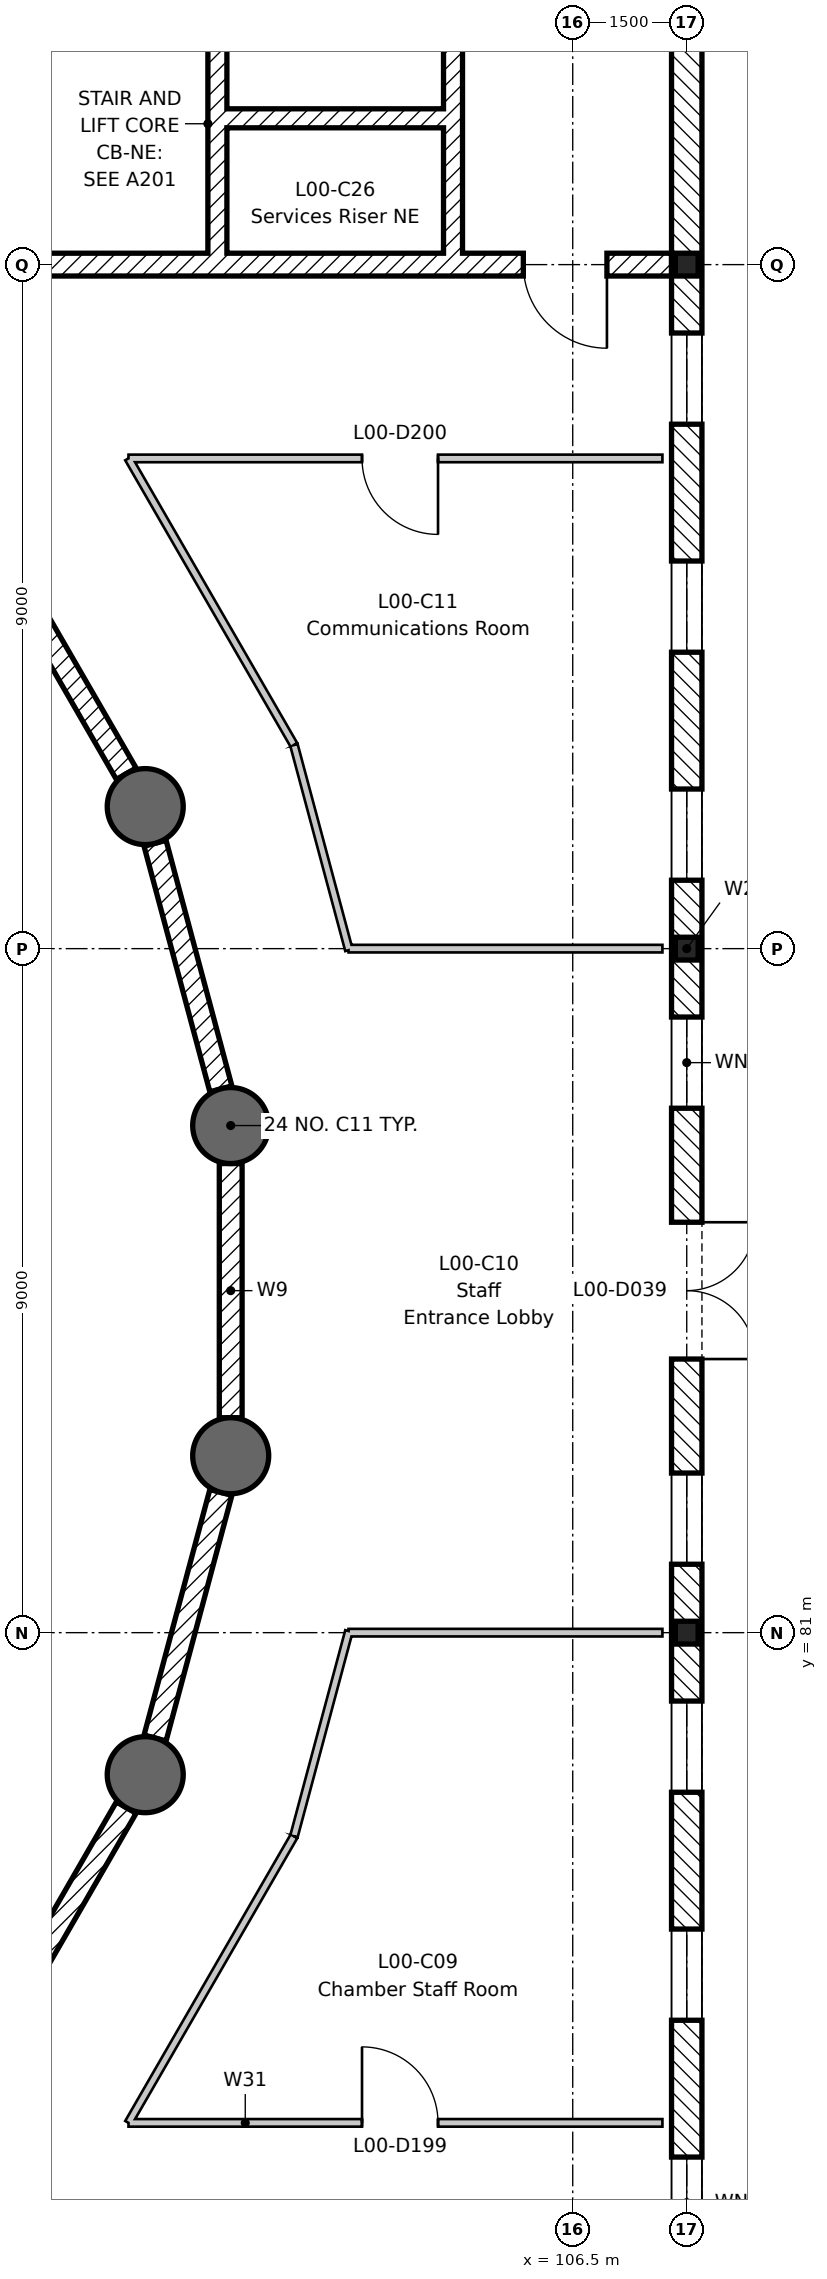
"""IFC4 building model, lengths in metres.
Left out: names, types, materials, properties, quantities, classifications, styles, units other than length and angle.
Written with IfcOpenShell. Run it as: python <this file> out.ifc"""

import sys

from ifc_helpers import new_model, si_unit, direction, frame, frame_2d, origin, origin_2d, place, context, subcontext, project, spatial, rectangle, circle, i_section, extrude, element, fill, save


model = new_model("IFC4")
c1 = context("Model", 3, precision=1e-05, world=origin(), true_north=direction((0.0, 1.0)))
c2 = subcontext(c1, "Body", "Model", "MODEL_VIEW")
j1 = project(units=[si_unit("LENGTHUNIT", "METRE"), si_unit("PLANEANGLEUNIT", "RADIAN")], contexts=[c1])
p1 = place(None, origin())
s1 = spatial("IfcSite", under=j1, at=p1, CompositionType="ELEMENT")
p2 = place(p1, origin())
s2 = spatial("IfcBuilding", under=s1, at=p2, CompositionType="ELEMENT")
p3 = place(p2, origin())
s3 = spatial("IfcBuildingStorey", under=s2, at=p3, CompositionType="ELEMENT", Elevation=0.0)
for number, where, z_axis, x_axis in (
    (1, (102.0, 87.672, -0.6), (0.0, 0.0, 1.0), (1.0, 0.0, 0.0)),
    (2, (100.875, 91.869, -0.6), (0.0, 0.0, 1.0), (1.0, 0.0, 0.0)),
    (3, (100.875, 79.131, -0.6), (0.0, 0.0, 1.0), (1.0, 0.0, 0.0)),
    (4, (102.0, 83.328, -0.6), (0.0, 0.0, 1.0), (1.0, 0.0, 0.0)),
):
    element("IfcColumn", number, at=place(p3, frame(where, z_axis=z_axis, x_axis=x_axis)), inside=s3, PredefinedType="COLUMN", context=c2, shape_type="SweptSolid", body=[
        extrude(circle(Radius=0.5, at=origin_2d()), origin(), (0.0, 0.0, 1.0), 5.8),
    ])
for number, where, z_axis, x_axis in (
    (5, (108.0, 81.0, -0.6), (0.0, 0.0, 1.0), (1.0, 0.0, 0.0)),
    (6, (108.0, 90.0, -0.6), (0.0, 0.0, 1.0), (1.0, 0.0, 0.0)),
    (7, (108.0, 99.0, -0.6), (0.0, 0.0, 1.0), (1.0, 0.0, 0.0)),
):
    element("IfcColumn", number, at=place(p3, frame(where, z_axis=z_axis, x_axis=x_axis)), inside=s3, PredefinedType="COLUMN", context=c2, shape_type="SweptSolid", body=[
        extrude(i_section(OverallWidth=0.3, OverallDepth=0.3, WebThickness=0.011, FlangeThickness=0.019, FilletRadius=0.027, at=origin_2d()), origin(), (0.0, 0.0, 1.0), 5.8),
    ])
for number, where, z_axis, x_axis in (
    (8, (101.871, 88.155, 0.0), (0.0, 0.0, 1.0), (-0.259, 0.966, 0.0)),
    (9, (100.625, 92.302, 0.0), (0.0, 0.0, 1.0), (-0.5, 0.866, 0.0)),
    (10, (98.953, 75.802, 0.0), (0.0, 0.0, 1.0), (0.5, 0.866, 0.0)),
    (11, (101.005, 79.614, 0.0), (0.0, 0.0, 1.0), (0.259, 0.966, 0.0)),
):
    element("IfcWall", number, at=place(p3, frame(where, z_axis=z_axis, x_axis=x_axis)), inside=s3, PredefinedType="PARTITIONING", context=c2, shape_type="SweptSolid", body=[
        extrude(rectangle(XDim=3.344, YDim=0.3, at=frame_2d((1.672, 0.0))), origin(), (0.0, 0.0, 1.0), 4.91),
    ])
p4 = place(p3, frame((102.0, 83.828, 0.0), z_axis=(0.0, 0.0, 1.0), x_axis=(0.0, 1.0, 0.0)))
e12 = element("IfcWall", 12, at=p4, inside=s3, PredefinedType="PARTITIONING", context=c2, shape_type="SweptSolid", body=[
    extrude(rectangle(XDim=3.345, YDim=0.3, at=frame_2d((1.672, 0.0))), origin(), (0.0, 0.0, 1.0), 4.91),
])
p5 = place(p3, frame((107.8, 99.0, 0.0), z_axis=(0.0, 0.0, 1.0), x_axis=(-1.0, 0.0, 0.0)))
e13 = element("IfcWall", 13, at=p5, inside=s3, PredefinedType="SHEAR", context=c2, shape_type="SweptSolid", body=[
    extrude(rectangle(XDim=8.95, YDim=0.3, at=frame_2d((4.475, 0.0))), origin(), (0.0, 0.0, 1.0), 5.2),
])
p6 = place(p5, frame((0.85, 0.0, 0.0)))
e14 = element("IfcOpeningElement", 14, at=p6, cuts=e13, PredefinedType="OPENING", context=c2, shape_type="SweptSolid", body=[
    extrude(rectangle(XDim=1.1, YDim=2.1, at=frame_2d((0.55, 1.05))), frame((0.0, 0.16, 0.0), z_axis=(0.0, -1.0, 0.0), x_axis=(1.0, 0.0, 0.0)), (0.0, 0.0, 1.0), 0.32),
])
p7 = place(p3, frame((104.925, 107.8, 0.0), z_axis=(0.0, 0.0, 1.0), x_axis=(0.0, -1.0, 0.0)))
e15 = element("IfcWall", 15, at=p7, inside=s3, PredefinedType="SHEAR", context=c2, shape_type="SweptSolid", body=[
    extrude(rectangle(XDim=8.65, YDim=0.25, at=frame_2d((4.325, 0.0))), origin(), (0.0, 0.0, 1.0), 5.2),
])
p8 = place(p7, frame((0.4, 0.0, 0.0)))
e16 = element("IfcOpeningElement", 16, at=p8, cuts=e15, PredefinedType="OPENING", context=c2, shape_type="SweptSolid", body=[
    extrude(rectangle(XDim=1.0, YDim=2.1, at=frame_2d((0.5, 1.05))), frame((0.0, 0.135, 0.0), z_axis=(0.0, -1.0, 0.0), x_axis=(1.0, 0.0, 0.0)), (0.0, 0.0, 1.0), 0.27),
])
p9 = place(p3, frame((101.825, 107.8, 0.0), z_axis=(0.0, 0.0, 1.0), x_axis=(0.0, -1.0, 0.0)))
e17 = element("IfcWall", 17, at=p9, inside=s3, PredefinedType="SHEAR", context=c2, shape_type="SweptSolid", body=[
    extrude(rectangle(XDim=8.65, YDim=0.25, at=frame_2d((4.325, 0.0))), origin(), (0.0, 0.0, 1.0), 5.2),
])
p10 = place(p3, frame((104.8, 100.925, 0.0), z_axis=(0.0, 0.0, 1.0), x_axis=(-1.0, 0.0, 0.0)))
e18 = element("IfcWall", 18, at=p10, inside=s3, PredefinedType="SHEAR", context=c2, shape_type="SweptSolid", body=[
    extrude(rectangle(XDim=2.85, YDim=0.25, at=frame_2d((1.425, 0.0))), origin(), (0.0, 0.0, 1.0), 5.2),
])
p11 = place(p3, frame((108.0, 72.0, 0.0), z_axis=(0.0, 0.0, 1.0), x_axis=(0.0, 1.0, 0.0)))
e19 = element("IfcWall", 19, at=p11, inside=s3, PredefinedType="STANDARD", context=c2, shape_type="SweptSolid", body=[
    extrude(rectangle(XDim=27.0, YDim=0.4, at=frame_2d((13.5, 0.0))), origin(), (0.0, 0.0, 1.0), 4.71),
])
p12 = place(p11, frame((12.6, 0.0, 0.0)))
e20 = element("IfcOpeningElement", 20, at=p12, cuts=e19, PredefinedType="OPENING", context=c2, shape_type="SweptSolid", body=[
    extrude(rectangle(XDim=1.8, YDim=2.4, at=frame_2d((0.9, 1.2))), frame((0.0, 0.21, 0.0), z_axis=(0.0, -1.0, 0.0), x_axis=(1.0, 0.0, 0.0)), (0.0, 0.0, 1.0), 0.42),
])
p13 = place(p11, frame((0.9, 0.0, 0.9)))
e21 = element("IfcOpeningElement", 21, at=p13, cuts=e19, PredefinedType="OPENING", context=c2, shape_type="SweptSolid", body=[
    extrude(rectangle(XDim=1.2, YDim=2.4, at=frame_2d((0.6, 1.2))), frame((0.0, 0.21, 0.0), z_axis=(0.0, -1.0, 0.0), x_axis=(1.0, 0.0, 0.0)), (0.0, 0.0, 1.0), 0.42),
])
p14 = place(p11, frame((3.9, 0.0, 0.9)))
e22 = element("IfcOpeningElement", 22, at=p14, cuts=e19, PredefinedType="OPENING", context=c2, shape_type="SweptSolid", body=[
    extrude(rectangle(XDim=1.2, YDim=2.4, at=frame_2d((0.6, 1.2))), frame((0.0, 0.21, 0.0), z_axis=(0.0, -1.0, 0.0), x_axis=(1.0, 0.0, 0.0)), (0.0, 0.0, 1.0), 0.42),
])
p15 = place(p11, frame((6.9, 0.0, 0.9)))
e23 = element("IfcOpeningElement", 23, at=p15, cuts=e19, PredefinedType="OPENING", context=c2, shape_type="SweptSolid", body=[
    extrude(rectangle(XDim=1.2, YDim=2.4, at=frame_2d((0.6, 1.2))), frame((0.0, 0.21, 0.0), z_axis=(0.0, -1.0, 0.0), x_axis=(1.0, 0.0, 0.0)), (0.0, 0.0, 1.0), 0.42),
])
p16 = place(p11, frame((9.9, 0.0, 0.9)))
e24 = element("IfcOpeningElement", 24, at=p16, cuts=e19, PredefinedType="OPENING", context=c2, shape_type="SweptSolid", body=[
    extrude(rectangle(XDim=1.2, YDim=2.4, at=frame_2d((0.6, 1.2))), frame((0.0, 0.21, 0.0), z_axis=(0.0, -1.0, 0.0), x_axis=(1.0, 0.0, 0.0)), (0.0, 0.0, 1.0), 0.42),
])
p17 = place(p11, frame((15.9, 0.0, 0.9)))
e25 = element("IfcOpeningElement", 25, at=p17, cuts=e19, PredefinedType="OPENING", context=c2, shape_type="SweptSolid", body=[
    extrude(rectangle(XDim=1.2, YDim=2.4, at=frame_2d((0.6, 1.2))), frame((0.0, 0.21, 0.0), z_axis=(0.0, -1.0, 0.0), x_axis=(1.0, 0.0, 0.0)), (0.0, 0.0, 1.0), 0.42),
])
p18 = place(p11, frame((18.9, 0.0, 0.9)))
e26 = element("IfcOpeningElement", 26, at=p18, cuts=e19, PredefinedType="OPENING", context=c2, shape_type="SweptSolid", body=[
    extrude(rectangle(XDim=1.2, YDim=2.4, at=frame_2d((0.6, 1.2))), frame((0.0, 0.21, 0.0), z_axis=(0.0, -1.0, 0.0), x_axis=(1.0, 0.0, 0.0)), (0.0, 0.0, 1.0), 0.42),
])
p19 = place(p11, frame((21.9, 0.0, 0.9)))
e27 = element("IfcOpeningElement", 27, at=p19, cuts=e19, PredefinedType="OPENING", context=c2, shape_type="SweptSolid", body=[
    extrude(rectangle(XDim=1.2, YDim=2.4, at=frame_2d((0.6, 1.2))), frame((0.0, 0.21, 0.0), z_axis=(0.0, -1.0, 0.0), x_axis=(1.0, 0.0, 0.0)), (0.0, 0.0, 1.0), 0.42),
])
p20 = place(p11, frame((24.9, 0.0, 0.9)))
e28 = element("IfcOpeningElement", 28, at=p20, cuts=e19, PredefinedType="OPENING", context=c2, shape_type="SweptSolid", body=[
    extrude(rectangle(XDim=1.2, YDim=2.4, at=frame_2d((0.6, 1.2))), frame((0.0, 0.21, 0.0), z_axis=(0.0, -1.0, 0.0), x_axis=(1.0, 0.0, 0.0)), (0.0, 0.0, 1.0), 0.42),
])
p21 = place(p3, frame((108.0, 99.0, 0.0), z_axis=(0.0, 0.0, 1.0), x_axis=(0.0, 1.0, 0.0)))
e29 = element("IfcWall", 29, at=p21, inside=s3, PredefinedType="STANDARD", context=c2, shape_type="SweptSolid", body=[
    extrude(rectangle(XDim=4.4, YDim=0.4, at=frame_2d((2.2, 0.0))), origin(), (0.0, 0.0, 1.0), 5.2),
])
p22 = place(p3, frame((107.68, 81.0, 0.0), z_axis=(0.0, 0.0, 1.0), x_axis=(-1.0, 0.0, 0.0)))
e30 = element("IfcWall", 30, at=p22, inside=s3, PredefinedType="PARTITIONING", context=c2, shape_type="SweptSolid", body=[
    extrude(rectangle(XDim=4.13, YDim=0.1, at=frame_2d((2.065, 0.0))), origin(), (0.0, 0.0, 1.0), 4.71),
])
p23 = place(p3, frame((103.556, 81.02, 0.0), z_axis=(0.0, 0.0, 1.0), x_axis=(-0.258782667083, -0.965935573016, 0.0)))
e31 = element("IfcWall", 31, at=p23, inside=s3, PredefinedType="PARTITIONING", context=c2, shape_type="SweptSolid", body=[
    extrude(rectangle(XDim=2.794, YDim=0.1, at=frame_2d((1.397, 0.0))), origin(), (0.0, 0.0, 1.0), 4.71),
])
p24 = place(p3, frame((102.833, 78.321, 0.0), z_axis=(0.0, 0.0, 1.0), x_axis=(-0.499992644437, -0.866029650479, 0.0)))
e32 = element("IfcWall", 32, at=p24, inside=s3, PredefinedType="PARTITIONING", context=c2, shape_type="SweptSolid", body=[
    extrude(rectangle(XDim=4.354, YDim=0.1, at=frame_2d((2.177, 0.0))), origin(), (0.0, 0.0, 1.0), 4.71),
])
p25 = place(p3, frame((100.656, 74.55, 0.0), z_axis=(0.0, 0.0, 1.0), x_axis=(1.0, 0.0, 0.0)))
e33 = element("IfcWall", 33, at=p25, inside=s3, PredefinedType="PARTITIONING", context=c2, shape_type="SweptSolid", body=[
    extrude(rectangle(XDim=7.024, YDim=0.1, at=frame_2d((3.512, 0.0))), origin(), (0.0, 0.0, 1.0), 4.71),
])
p26 = place(p25, frame((3.072, 0.0, 0.0)))
e34 = element("IfcOpeningElement", 34, at=p26, cuts=e33, PredefinedType="OPENING", context=c2, shape_type="SweptSolid", body=[
    extrude(rectangle(XDim=1.0, YDim=2.1, at=frame_2d((0.5, 1.05))), frame((0.0, 0.06, 0.0), z_axis=(0.0, -1.0, 0.0), x_axis=(1.0, 0.0, 0.0)), (0.0, 0.0, 1.0), 0.12),
])
p27 = place(p3, frame((107.68, 90.0, 0.0), z_axis=(0.0, 0.0, 1.0), x_axis=(-1.0, 0.0, 0.0)))
e35 = element("IfcWall", 35, at=p27, inside=s3, PredefinedType="PARTITIONING", context=c2, shape_type="SweptSolid", body=[
    extrude(rectangle(XDim=4.13, YDim=0.1, at=frame_2d((2.065, 0.0))), origin(), (0.0, 0.0, 1.0), 4.71),
])
p28 = place(p3, frame((107.68, 96.45, 0.0), z_axis=(0.0, 0.0, 1.0), x_axis=(-1.0, 0.0, 0.0)))
e36 = element("IfcWall", 36, at=p28, inside=s3, PredefinedType="PARTITIONING", context=c2, shape_type="SweptSolid", body=[
    extrude(rectangle(XDim=7.024, YDim=0.1, at=frame_2d((3.512, 0.0))), origin(), (0.0, 0.0, 1.0), 4.71),
])
p29 = place(p28, frame((2.952, 0.0, 0.0)))
e37 = element("IfcOpeningElement", 37, at=p29, cuts=e36, PredefinedType="OPENING", context=c2, shape_type="SweptSolid", body=[
    extrude(rectangle(XDim=1.0, YDim=2.1, at=frame_2d((0.5, 1.05))), frame((0.0, 0.06, 0.0), z_axis=(0.0, -1.0, 0.0), x_axis=(1.0, 0.0, 0.0)), (0.0, 0.0, 1.0), 0.12),
])
p30 = place(p3, frame((100.656, 96.45, 0.0), z_axis=(0.0, 0.0, 1.0), x_axis=(0.499992644437, -0.866029650479, 0.0)))
e38 = element("IfcWall", 38, at=p30, inside=s3, PredefinedType="PARTITIONING", context=c2, shape_type="SweptSolid", body=[
    extrude(rectangle(XDim=4.354, YDim=0.1, at=frame_2d((2.177, 0.0))), origin(), (0.0, 0.0, 1.0), 4.71),
])
p31 = place(p3, frame((102.833, 92.679, 0.0), z_axis=(0.0, 0.0, 1.0), x_axis=(0.258782667083, -0.965935573016, 0.0)))
e39 = element("IfcWall", 39, at=p31, inside=s3, PredefinedType="PARTITIONING", context=c2, shape_type="SweptSolid", body=[
    extrude(rectangle(XDim=2.794, YDim=0.1, at=frame_2d((1.397, 0.0))), origin(), (0.0, 0.0, 1.0), 4.71),
])
p32 = place(p12, frame((1.8, 0.0, 0.0), z_axis=(0.0, 0.0, 1.0), x_axis=(-1.0, 0.0, 0.0)))
e40 = element("IfcDoor", 40, at=p32, inside=s3, OperationType="DOUBLE_DOOR_SINGLE_SWING", PredefinedType="DOOR", context=c2, shape_type="SweptSolid", body=[
    extrude(rectangle(XDim=1.8, YDim=2.4, at=frame_2d((0.9, 1.2))), frame((0.0, 0.025, 0.0), z_axis=(0.0, -1.0, 0.0), x_axis=(1.0, 0.0, 0.0)), (0.0, 0.0, 1.0), 0.05),
])
fill(e20, e40)
p33 = place(p13, origin())
e41 = element("IfcWindow", 41, at=p33, inside=s3, PartitioningType="SINGLE_PANEL", PredefinedType="WINDOW", context=c2, shape_type="SweptSolid", body=[
    extrude(rectangle(XDim=1.2, YDim=2.4, at=frame_2d((0.6, 1.2))), frame((0.0, 0.03, 0.0), z_axis=(0.0, -1.0, 0.0), x_axis=(1.0, 0.0, 0.0)), (0.0, 0.0, 1.0), 0.06),
])
fill(e21, e41)
p34 = place(p14, origin())
e42 = element("IfcWindow", 42, at=p34, inside=s3, PartitioningType="SINGLE_PANEL", PredefinedType="WINDOW", context=c2, shape_type="SweptSolid", body=[
    extrude(rectangle(XDim=1.2, YDim=2.4, at=frame_2d((0.6, 1.2))), frame((0.0, 0.03, 0.0), z_axis=(0.0, -1.0, 0.0), x_axis=(1.0, 0.0, 0.0)), (0.0, 0.0, 1.0), 0.06),
])
fill(e22, e42)
p35 = place(p15, origin())
e43 = element("IfcWindow", 43, at=p35, inside=s3, PartitioningType="SINGLE_PANEL", PredefinedType="WINDOW", context=c2, shape_type="SweptSolid", body=[
    extrude(rectangle(XDim=1.2, YDim=2.4, at=frame_2d((0.6, 1.2))), frame((0.0, 0.03, 0.0), z_axis=(0.0, -1.0, 0.0), x_axis=(1.0, 0.0, 0.0)), (0.0, 0.0, 1.0), 0.06),
])
fill(e23, e43)
p36 = place(p16, origin())
e44 = element("IfcWindow", 44, at=p36, inside=s3, PartitioningType="SINGLE_PANEL", PredefinedType="WINDOW", context=c2, shape_type="SweptSolid", body=[
    extrude(rectangle(XDim=1.2, YDim=2.4, at=frame_2d((0.6, 1.2))), frame((0.0, 0.03, 0.0), z_axis=(0.0, -1.0, 0.0), x_axis=(1.0, 0.0, 0.0)), (0.0, 0.0, 1.0), 0.06),
])
fill(e24, e44)
p37 = place(p17, origin())
e45 = element("IfcWindow", 45, at=p37, inside=s3, PartitioningType="SINGLE_PANEL", PredefinedType="WINDOW", context=c2, shape_type="SweptSolid", body=[
    extrude(rectangle(XDim=1.2, YDim=2.4, at=frame_2d((0.6, 1.2))), frame((0.0, 0.03, 0.0), z_axis=(0.0, -1.0, 0.0), x_axis=(1.0, 0.0, 0.0)), (0.0, 0.0, 1.0), 0.06),
])
fill(e25, e45)
p38 = place(p18, origin())
e46 = element("IfcWindow", 46, at=p38, inside=s3, PartitioningType="SINGLE_PANEL", PredefinedType="WINDOW", context=c2, shape_type="SweptSolid", body=[
    extrude(rectangle(XDim=1.2, YDim=2.4, at=frame_2d((0.6, 1.2))), frame((0.0, 0.03, 0.0), z_axis=(0.0, -1.0, 0.0), x_axis=(1.0, 0.0, 0.0)), (0.0, 0.0, 1.0), 0.06),
])
fill(e26, e46)
p39 = place(p19, origin())
e47 = element("IfcWindow", 47, at=p39, inside=s3, PartitioningType="SINGLE_PANEL", PredefinedType="WINDOW", context=c2, shape_type="SweptSolid", body=[
    extrude(rectangle(XDim=1.2, YDim=2.4, at=frame_2d((0.6, 1.2))), frame((0.0, 0.03, 0.0), z_axis=(0.0, -1.0, 0.0), x_axis=(1.0, 0.0, 0.0)), (0.0, 0.0, 1.0), 0.06),
])
fill(e27, e47)
p40 = place(p20, origin())
e48 = element("IfcWindow", 48, at=p40, inside=s3, PartitioningType="SINGLE_PANEL", PredefinedType="WINDOW", context=c2, shape_type="SweptSolid", body=[
    extrude(rectangle(XDim=1.2, YDim=2.4, at=frame_2d((0.6, 1.2))), frame((0.0, 0.03, 0.0), z_axis=(0.0, -1.0, 0.0), x_axis=(1.0, 0.0, 0.0)), (0.0, 0.0, 1.0), 0.06),
])
fill(e28, e48)
p41 = place(p6, origin())
e49 = element("IfcDoor", 49, at=p41, inside=s3, OperationType="SINGLE_SWING_LEFT", PredefinedType="DOOR", context=c2, shape_type="SweptSolid", body=[
    extrude(rectangle(XDim=1.1, YDim=2.1, at=frame_2d((0.55, 1.05))), frame((0.0, 0.025, 0.0), z_axis=(0.0, -1.0, 0.0), x_axis=(1.0, 0.0, 0.0)), (0.0, 0.0, 1.0), 0.05),
])
fill(e14, e49)
p42 = place(p26, origin())
e50 = element("IfcDoor", 50, at=p42, inside=s3, OperationType="SINGLE_SWING_LEFT", PredefinedType="DOOR", context=c2, shape_type="SweptSolid", body=[
    extrude(rectangle(XDim=1.0, YDim=2.1, at=frame_2d((0.5, 1.05))), frame((0.0, 0.025, 0.0), z_axis=(0.0, -1.0, 0.0), x_axis=(1.0, 0.0, 0.0)), (0.0, 0.0, 1.0), 0.05),
])
fill(e34, e50)
p43 = place(p29, origin())
e51 = element("IfcDoor", 51, at=p43, inside=s3, OperationType="SINGLE_SWING_LEFT", PredefinedType="DOOR", context=c2, shape_type="SweptSolid", body=[
    extrude(rectangle(XDim=1.0, YDim=2.1, at=frame_2d((0.5, 1.05))), frame((0.0, 0.025, 0.0), z_axis=(0.0, -1.0, 0.0), x_axis=(1.0, 0.0, 0.0)), (0.0, 0.0, 1.0), 0.05),
])
fill(e37, e51)
save(model, sys.argv[1])
